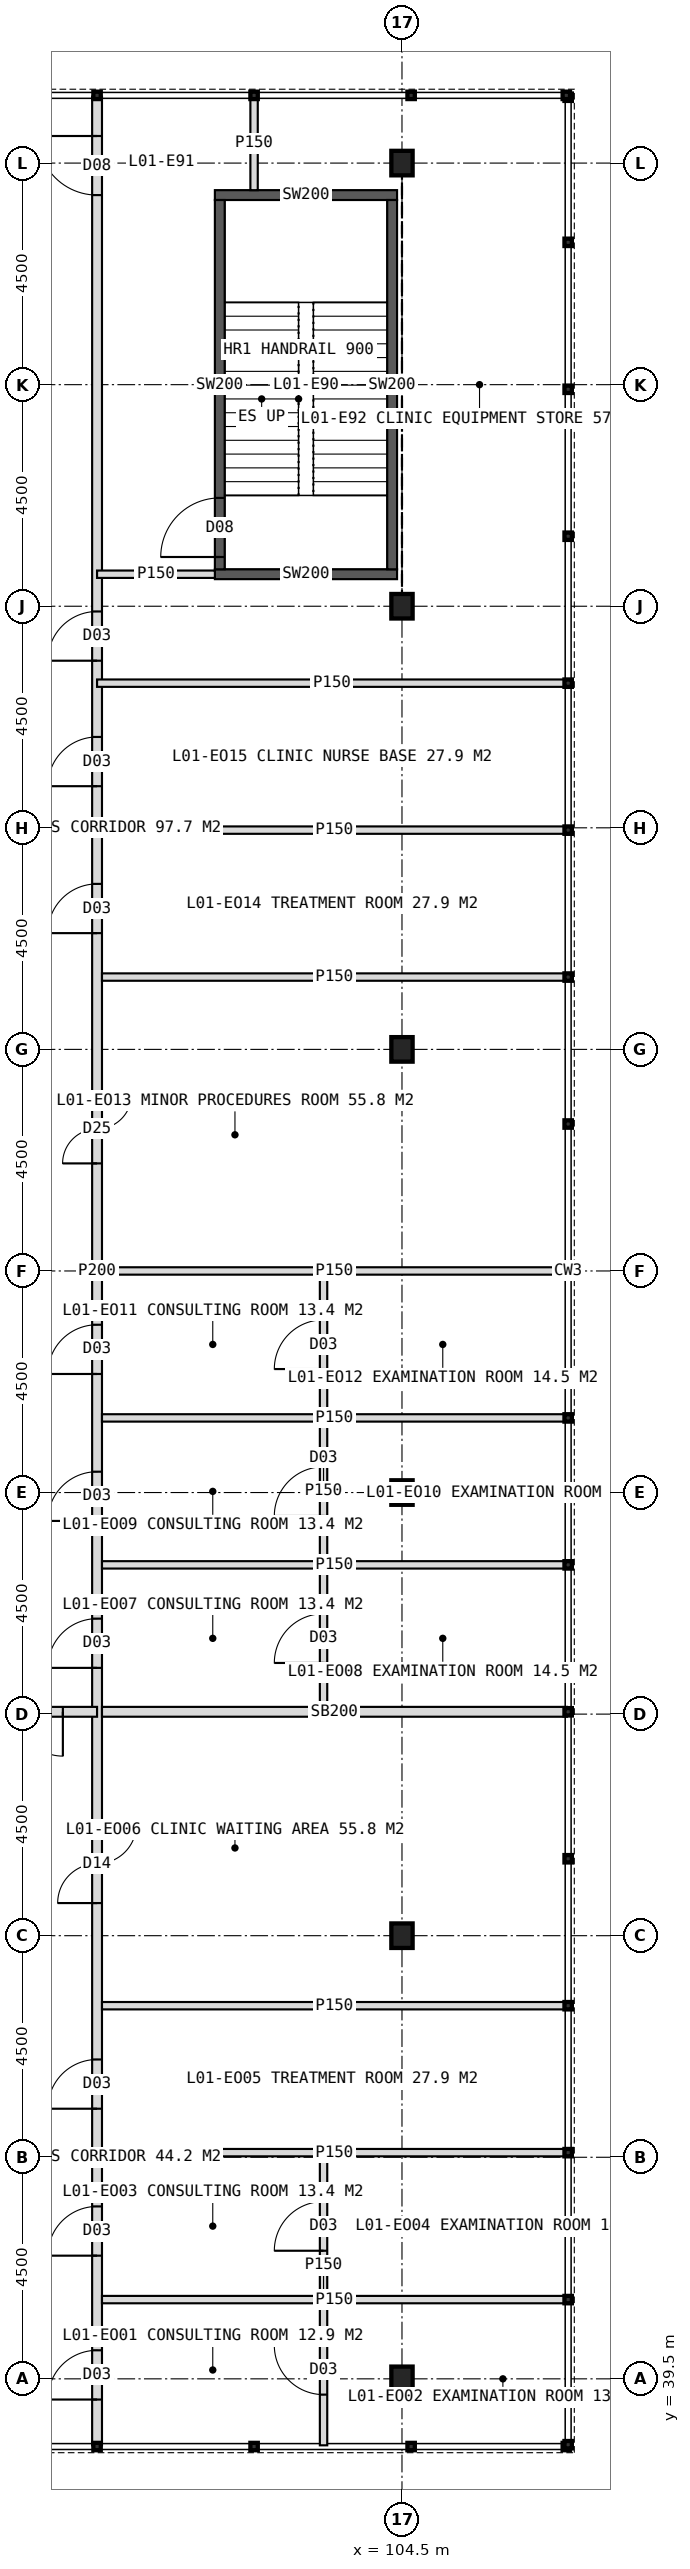
"""IFC4 building model, lengths in metres.
Left out: names, types, materials, properties, quantities, classifications, styles, units other than length and angle.
Written with IfcOpenShell. Run it as: python <this file> out.ifc"""

import sys

from ifc_helpers import new_model, si_unit, direction, frame, frame_2d, origin, origin_2d, place, context, subcontext, project, spatial, rectangle, i_section, extrude, element, fill, save


model = new_model("IFC4")
c1 = context("Model", 3, precision=1e-05, world=origin(), true_north=direction((0.0, 1.0)))
c2 = subcontext(c1, "Body", "Model", "MODEL_VIEW")
j1 = project(units=[si_unit("LENGTHUNIT", "METRE"), si_unit("PLANEANGLEUNIT", "RADIAN")], contexts=[c1])
p1 = place(None, origin())
s1 = spatial("IfcSite", under=j1, at=p1, CompositionType="ELEMENT")
p2 = place(p1, origin())
s2 = spatial("IfcBuilding", under=s1, at=p2, CompositionType="ELEMENT")
p3 = place(p2, frame((0.0, 0.0, 6.0)))
s3 = spatial("IfcBuildingStorey", under=s2, at=p3, CompositionType="ELEMENT", Elevation=6.0)
for number, where, z_axis, x_axis in (
    (1, (104.5, 39.5, 0.0), (0.0, 0.0, 1.0), (1.0, 0.0, 0.0)),
    (2, (104.5, 48.5, 0.0), (0.0, 0.0, 1.0), (1.0, 0.0, 0.0)),
    (3, (104.5, 57.5, 0.0), (0.0, 0.0, 1.0), (1.0, 0.0, 0.0)),
    (4, (104.5, 66.5, 0.0), (0.0, 0.0, 1.0), (1.0, 0.0, 0.0)),
    (5, (104.5, 75.5, 0.0), (0.0, 0.0, 1.0), (1.0, 0.0, 0.0)),
    (6, (104.5, 84.5, 0.0), (0.0, 0.0, 1.0), (1.0, 0.0, 0.0)),
):
    element("IfcColumn", number, at=place(p3, frame(where, z_axis=z_axis, x_axis=x_axis)), inside=s3, PredefinedType="COLUMN", context=c2, shape_type="SweptSolid", body=[
        extrude(i_section(OverallWidth=0.432, OverallDepth=0.498, WebThickness=0.056, FlangeThickness=0.089, FilletRadius=0.015, at=origin_2d()), origin(), (0.0, 0.0, 1.0), 5.0),
    ])
p4 = place(p3, frame((98.307, 38.15, 0.0), z_axis=(0.0, 0.0, 1.0), x_axis=(0.0, 1.0, 0.0)))
e7 = element("IfcWall", 7, at=p4, inside=s3, PredefinedType="PARTITIONING", context=c2, shape_type="SweptSolid", body=[
    extrude(rectangle(XDim=47.7, YDim=0.2, at=frame_2d((23.85, 0.0))), origin(), (0.0, 0.0, 1.0), 4.7),
])
p5 = place(p4, frame((45.7, 0.0, 0.0)))
e8 = element("IfcOpeningElement", 8, at=p5, cuts=e7, PredefinedType="OPENING", context=c2, shape_type="SweptSolid", body=[
    extrude(rectangle(XDim=1.2, YDim=2.1, at=frame_2d((0.6, 1.05))), frame((0.0, 0.11, 0.0), z_axis=(0.0, -1.0, 0.0), x_axis=(1.0, 0.0, 0.0)), (0.0, 0.0, 1.0), 0.22),
])
p6 = place(p4, frame((36.244, 0.0, 0.0)))
e9 = element("IfcOpeningElement", 9, at=p6, cuts=e7, PredefinedType="OPENING", context=c2, shape_type="SweptSolid", body=[
    extrude(rectangle(XDim=1.0, YDim=2.1, at=frame_2d((0.5, 1.05))), frame((0.0, 0.11, 0.0), z_axis=(0.0, -1.0, 0.0), x_axis=(1.0, 0.0, 0.0)), (0.0, 0.0, 1.0), 0.22),
])
p7 = place(p4, frame((0.93, 0.0, 0.0)))
e10 = element("IfcOpeningElement", 10, at=p7, cuts=e7, PredefinedType="OPENING", context=c2, shape_type="SweptSolid", body=[
    extrude(rectangle(XDim=1.0, YDim=2.1, at=frame_2d((0.5, 1.05))), frame((0.0, 0.11, 0.0), z_axis=(0.0, -1.0, 0.0), x_axis=(1.0, 0.0, 0.0)), (0.0, 0.0, 1.0), 0.22),
])
p8 = place(p4, frame((3.852, 0.0, 0.0)))
e11 = element("IfcOpeningElement", 11, at=p8, cuts=e7, PredefinedType="OPENING", context=c2, shape_type="SweptSolid", body=[
    extrude(rectangle(XDim=1.0, YDim=2.1, at=frame_2d((0.5, 1.05))), frame((0.0, 0.11, 0.0), z_axis=(0.0, -1.0, 0.0), x_axis=(1.0, 0.0, 0.0)), (0.0, 0.0, 1.0), 0.22),
])
p9 = place(p4, frame((6.836, 0.0, 0.0)))
e12 = element("IfcOpeningElement", 12, at=p9, cuts=e7, PredefinedType="OPENING", context=c2, shape_type="SweptSolid", body=[
    extrude(rectangle(XDim=1.0, YDim=2.1, at=frame_2d((0.5, 1.05))), frame((0.0, 0.11, 0.0), z_axis=(0.0, -1.0, 0.0), x_axis=(1.0, 0.0, 0.0)), (0.0, 0.0, 1.0), 0.22),
])
p10 = place(p4, frame((11.012, 0.0, 0.0)))
e13 = element("IfcOpeningElement", 13, at=p10, cuts=e7, PredefinedType="OPENING", context=c2, shape_type="SweptSolid", body=[
    extrude(rectangle(XDim=1.6, YDim=2.2, at=frame_2d((0.8, 1.1))), frame((0.0, 0.11, 0.0), z_axis=(0.0, -1.0, 0.0), x_axis=(1.0, 0.0, 0.0)), (0.0, 0.0, 1.0), 0.22),
])
p11 = place(p4, frame((15.789, 0.0, 0.0)))
e14 = element("IfcOpeningElement", 14, at=p11, cuts=e7, PredefinedType="OPENING", context=c2, shape_type="SweptSolid", body=[
    extrude(rectangle(XDim=1.0, YDim=2.1, at=frame_2d((0.5, 1.05))), frame((0.0, 0.11, 0.0), z_axis=(0.0, -1.0, 0.0), x_axis=(1.0, 0.0, 0.0)), (0.0, 0.0, 1.0), 0.22),
])
p12 = place(p4, frame((18.773, 0.0, 0.0)))
e15 = element("IfcOpeningElement", 15, at=p12, cuts=e7, PredefinedType="OPENING", context=c2, shape_type="SweptSolid", body=[
    extrude(rectangle(XDim=1.0, YDim=2.1, at=frame_2d((0.5, 1.05))), frame((0.0, 0.11, 0.0), z_axis=(0.0, -1.0, 0.0), x_axis=(1.0, 0.0, 0.0)), (0.0, 0.0, 1.0), 0.22),
])
p13 = place(p4, frame((21.758, 0.0, 0.0)))
e16 = element("IfcOpeningElement", 16, at=p13, cuts=e7, PredefinedType="OPENING", context=c2, shape_type="SweptSolid", body=[
    extrude(rectangle(XDim=1.0, YDim=2.1, at=frame_2d((0.5, 1.05))), frame((0.0, 0.11, 0.0), z_axis=(0.0, -1.0, 0.0), x_axis=(1.0, 0.0, 0.0)), (0.0, 0.0, 1.0), 0.22),
])
p14 = place(p4, frame((26.034, 0.0, 0.0)))
e17 = element("IfcOpeningElement", 17, at=p14, cuts=e7, PredefinedType="OPENING", context=c2, shape_type="SweptSolid", body=[
    extrude(rectangle(XDim=1.4, YDim=2.2, at=frame_2d((0.7, 1.1))), frame((0.0, 0.11, 0.0), z_axis=(0.0, -1.0, 0.0), x_axis=(1.0, 0.0, 0.0)), (0.0, 0.0, 1.0), 0.22),
])
p15 = place(p4, frame((30.711, 0.0, 0.0)))
e18 = element("IfcOpeningElement", 18, at=p15, cuts=e7, PredefinedType="OPENING", context=c2, shape_type="SweptSolid", body=[
    extrude(rectangle(XDim=1.0, YDim=2.1, at=frame_2d((0.5, 1.05))), frame((0.0, 0.11, 0.0), z_axis=(0.0, -1.0, 0.0), x_axis=(1.0, 0.0, 0.0)), (0.0, 0.0, 1.0), 0.22),
])
p16 = place(p4, frame((33.695, 0.0, 0.0)))
e19 = element("IfcOpeningElement", 19, at=p16, cuts=e7, PredefinedType="OPENING", context=c2, shape_type="SweptSolid", body=[
    extrude(rectangle(XDim=1.0, YDim=2.1, at=frame_2d((0.5, 1.05))), frame((0.0, 0.11, 0.0), z_axis=(0.0, -1.0, 0.0), x_axis=(1.0, 0.0, 0.0)), (0.0, 0.0, 1.0), 0.22),
])
p17 = place(p3, frame((98.307, 53.047, 0.0), z_axis=(0.0, 0.0, 1.0), x_axis=(-1.0, 0.0, 0.0)))
e20 = element("IfcWall", 20, at=p17, inside=s3, PredefinedType="SOLIDWALL", context=c2, shape_type="SweptSolid", body=[
    extrude(rectangle(XDim=3.189, YDim=0.2, at=frame_2d((1.594, 0.0))), origin(), (0.0, 0.0, 1.0), 4.7),
])
p18 = place(p17, frame((0.695, 0.0, 0.0)))
e21 = element("IfcOpeningElement", 21, at=p18, cuts=e20, PredefinedType="OPENING", context=c2, shape_type="SweptSolid", body=[
    extrude(rectangle(XDim=1.8, YDim=2.2, at=frame_2d((0.9, 1.1))), frame((0.0, 0.11, 0.0), z_axis=(0.0, -1.0, 0.0), x_axis=(1.0, 0.0, 0.0)), (0.0, 0.0, 1.0), 0.22),
])
for number, where, z_axis, x_axis in (
    (22, (100.7, 76.15, 0.0), (0.0, 0.0, 1.0), (1.0, 0.0, 0.0)),
    (23, (100.7, 83.85, 0.0), (0.0, 0.0, 1.0), (1.0, 0.0, 0.0)),
):
    element("IfcWall", number, at=place(p3, frame(where, z_axis=z_axis, x_axis=x_axis)), inside=s3, PredefinedType="SOLIDWALL", context=c2, shape_type="SweptSolid", body=[
        extrude(rectangle(XDim=3.7, YDim=0.2, at=frame_2d((1.85, 0.0))), origin(), (0.0, 0.0, 1.0), 4.7),
    ])
p19 = place(p3, frame((100.8, 76.25, 0.0), z_axis=(0.0, 0.0, 1.0), x_axis=(0.0, 1.0, 0.0)))
e24 = element("IfcWall", 24, at=p19, inside=s3, PredefinedType="SOLIDWALL", context=c2, shape_type="SweptSolid", body=[
    extrude(rectangle(XDim=7.5, YDim=0.2, at=frame_2d((3.75, 0.0))), origin(), (0.0, 0.0, 1.0), 4.7),
])
p20 = place(p19, frame((0.25, 0.0, 0.0)))
e25 = element("IfcOpeningElement", 25, at=p20, cuts=e24, PredefinedType="OPENING", context=c2, shape_type="SweptSolid", body=[
    extrude(rectangle(XDim=1.2, YDim=2.1, at=frame_2d((0.6, 1.05))), frame((0.0, 0.11, 0.0), z_axis=(0.0, -1.0, 0.0), x_axis=(1.0, 0.0, 0.0)), (0.0, 0.0, 1.0), 0.22),
])
p21 = place(p3, frame((104.3, 76.25, 0.0), z_axis=(0.0, 0.0, 1.0), x_axis=(0.0, 1.0, 0.0)))
e26 = element("IfcWall", 26, at=p21, inside=s3, PredefinedType="SOLIDWALL", context=c2, shape_type="SweptSolid", body=[
    extrude(rectangle(XDim=7.5, YDim=0.2, at=frame_2d((3.75, 0.0))), origin(), (0.0, 0.0, 1.0), 4.7),
])
p22 = place(p3, frame((100.7, 76.15, 0.0), z_axis=(0.0, 0.0, 1.0), x_axis=(-1.0, 0.0, 0.0)))
e27 = element("IfcWall", 27, at=p22, inside=s3, PredefinedType="PARTITIONING", context=c2, shape_type="SweptSolid", body=[
    extrude(rectangle(XDim=2.393, YDim=0.15, at=frame_2d((1.197, 0.0))), origin(), (0.0, 0.0, 1.0), 4.7),
])
p23 = place(p3, frame((101.496, 83.95, 0.0), z_axis=(0.0, 0.0, 1.0), x_axis=(0.0, 1.0, 0.0)))
e28 = element("IfcWall", 28, at=p23, inside=s3, PredefinedType="PARTITIONING", context=c2, shape_type="SweptSolid", body=[
    extrude(rectangle(XDim=1.9, YDim=0.15, at=frame_2d((0.95, 0.0))), origin(), (0.0, 0.0, 1.0), 4.7),
])
p24 = place(p3, frame((107.85, 73.938, 0.0), z_axis=(0.0, 0.0, 1.0), x_axis=(-1.0, 0.0, 0.0)))
e29 = element("IfcWall", 29, at=p24, inside=s3, PredefinedType="PARTITIONING", context=c2, shape_type="SweptSolid", body=[
    extrude(rectangle(XDim=9.543, YDim=0.15, at=frame_2d((4.771, 0.0))), origin(), (0.0, 0.0, 1.0), 4.7),
])
for number, where, z_axis, x_axis in (
    (30, (107.85, 41.109, 0.0), (0.0, 0.0, 1.0), (-1.0, 0.0, 0.0)),
    (31, (107.85, 44.094, 0.0), (0.0, 0.0, 1.0), (-1.0, 0.0, 0.0)),
    (32, (107.85, 47.078, 0.0), (0.0, 0.0, 1.0), (-1.0, 0.0, 0.0)),
):
    element("IfcWall", number, at=place(p3, frame(where, z_axis=z_axis, x_axis=x_axis)), inside=s3, PredefinedType="PARTITIONING", context=c2, shape_type="SweptSolid", body=[
        extrude(rectangle(XDim=9.443, YDim=0.15, at=frame_2d((4.722, 0.0))), origin(), (0.0, 0.0, 1.0), 4.7),
    ])
p25 = place(p3, frame((107.85, 53.047, 0.0), z_axis=(0.0, 0.0, 1.0), x_axis=(-1.0, 0.0, 0.0)))
e33 = element("IfcWall", 33, at=p25, inside=s3, PredefinedType="SOLIDWALL", context=c2, shape_type="SweptSolid", body=[
    extrude(rectangle(XDim=9.443, YDim=0.2, at=frame_2d((4.722, 0.0))), origin(), (0.0, 0.0, 1.0), 4.7),
])
for number, where, z_axis, x_axis in (
    (34, (107.85, 56.031, 0.0), (0.0, 0.0, 1.0), (-1.0, 0.0, 0.0)),
    (35, (107.85, 59.016, 0.0), (0.0, 0.0, 1.0), (-1.0, 0.0, 0.0)),
    (36, (107.85, 62.0, 0.0), (0.0, 0.0, 1.0), (-1.0, 0.0, 0.0)),
    (37, (107.85, 67.969, 0.0), (0.0, 0.0, 1.0), (-1.0, 0.0, 0.0)),
    (38, (107.85, 70.953, 0.0), (0.0, 0.0, 1.0), (-1.0, 0.0, 0.0)),
):
    element("IfcWall", number, at=place(p3, frame(where, z_axis=z_axis, x_axis=x_axis)), inside=s3, PredefinedType="PARTITIONING", context=c2, shape_type="SweptSolid", body=[
        extrude(rectangle(XDim=9.443, YDim=0.15, at=frame_2d((4.722, 0.0))), origin(), (0.0, 0.0, 1.0), 4.7),
    ])
p26 = place(p3, frame((102.907, 38.15, 0.0), z_axis=(0.0, 0.0, 1.0), x_axis=(0.0, 1.0, 0.0)))
e39 = element("IfcWall", 39, at=p26, inside=s3, PredefinedType="PARTITIONING", context=c2, shape_type="SweptSolid", body=[
    extrude(rectangle(XDim=5.944, YDim=0.15, at=frame_2d((2.972, 0.0))), origin(), (0.0, 0.0, 1.0), 4.7),
])
p27 = place(p26, frame((1.03, 0.0, 0.0)))
e40 = element("IfcOpeningElement", 40, at=p27, cuts=e39, PredefinedType="OPENING", context=c2, shape_type="SweptSolid", body=[
    extrude(rectangle(XDim=1.0, YDim=2.1, at=frame_2d((0.5, 1.05))), frame((0.0, 0.085, 0.0), z_axis=(0.0, -1.0, 0.0), x_axis=(1.0, 0.0, 0.0)), (0.0, 0.0, 1.0), 0.17),
])
p28 = place(p26, frame((3.952, 0.0, 0.0)))
e41 = element("IfcOpeningElement", 41, at=p28, cuts=e39, PredefinedType="OPENING", context=c2, shape_type="SweptSolid", body=[
    extrude(rectangle(XDim=1.0, YDim=2.1, at=frame_2d((0.5, 1.05))), frame((0.0, 0.085, 0.0), z_axis=(0.0, -1.0, 0.0), x_axis=(1.0, 0.0, 0.0)), (0.0, 0.0, 1.0), 0.17),
])
p29 = place(p3, frame((102.907, 53.047, 0.0), z_axis=(0.0, 0.0, 1.0), x_axis=(0.0, 1.0, 0.0)))
e42 = element("IfcWall", 42, at=p29, inside=s3, PredefinedType="PARTITIONING", context=c2, shape_type="SweptSolid", body=[
    extrude(rectangle(XDim=8.953, YDim=0.15, at=frame_2d((4.477, 0.0))), origin(), (0.0, 0.0, 1.0), 4.7),
])
p30 = place(p29, frame((0.992, 0.0, 0.0)))
e43 = element("IfcOpeningElement", 43, at=p30, cuts=e42, PredefinedType="OPENING", context=c2, shape_type="SweptSolid", body=[
    extrude(rectangle(XDim=1.0, YDim=2.1, at=frame_2d((0.5, 1.05))), frame((0.0, 0.085, 0.0), z_axis=(0.0, -1.0, 0.0), x_axis=(1.0, 0.0, 0.0)), (0.0, 0.0, 1.0), 0.17),
])
p31 = place(p29, frame((3.977, 0.0, 0.0)))
e44 = element("IfcOpeningElement", 44, at=p31, cuts=e42, PredefinedType="OPENING", context=c2, shape_type="SweptSolid", body=[
    extrude(rectangle(XDim=1.0, YDim=2.1, at=frame_2d((0.5, 1.05))), frame((0.0, 0.085, 0.0), z_axis=(0.0, -1.0, 0.0), x_axis=(1.0, 0.0, 0.0)), (0.0, 0.0, 1.0), 0.17),
])
p32 = place(p29, frame((6.961, 0.0, 0.0)))
e45 = element("IfcOpeningElement", 45, at=p32, cuts=e42, PredefinedType="OPENING", context=c2, shape_type="SweptSolid", body=[
    extrude(rectangle(XDim=1.0, YDim=2.1, at=frame_2d((0.5, 1.05))), frame((0.0, 0.085, 0.0), z_axis=(0.0, -1.0, 0.0), x_axis=(1.0, 0.0, 0.0)), (0.0, 0.0, 1.0), 0.17),
])
p33 = place(p18, origin())
e46 = element("IfcDoor", 46, at=p33, inside=s3, OperationType="DOUBLE_DOOR_DOUBLE_SWING", PredefinedType="DOOR", context=c2, shape_type="SweptSolid", body=[
    extrude(rectangle(XDim=1.8, YDim=2.2, at=frame_2d((0.9, 1.1))), frame((0.0, 0.025, 0.0), z_axis=(0.0, -1.0, 0.0), x_axis=(1.0, 0.0, 0.0)), (0.0, 0.0, 1.0), 0.05),
])
fill(e21, e46)
p34 = place(p20, origin())
e47 = element("IfcDoor", 47, at=p34, inside=s3, OperationType="SINGLE_SWING_LEFT", PredefinedType="DOOR", context=c2, shape_type="SweptSolid", body=[
    extrude(rectangle(XDim=1.2, YDim=2.1, at=frame_2d((0.6, 1.05))), frame((0.0, 0.025, 0.0), z_axis=(0.0, -1.0, 0.0), x_axis=(1.0, 0.0, 0.0)), (0.0, 0.0, 1.0), 0.05),
])
fill(e25, e47)
p35 = place(p5, origin())
e48 = element("IfcDoor", 48, at=p35, inside=s3, OperationType="SINGLE_SWING_RIGHT", PredefinedType="DOOR", context=c2, shape_type="SweptSolid", body=[
    extrude(rectangle(XDim=1.2, YDim=2.1, at=frame_2d((0.6, 1.05))), frame((0.0, 0.025, 0.0), z_axis=(0.0, -1.0, 0.0), x_axis=(1.0, 0.0, 0.0)), (0.0, 0.0, 1.0), 0.05),
])
fill(e8, e48)
p36 = place(p6, origin())
e49 = element("IfcDoor", 49, at=p36, inside=s3, OperationType="SINGLE_SWING_LEFT", PredefinedType="DOOR", context=c2, shape_type="SweptSolid", body=[
    extrude(rectangle(XDim=1.0, YDim=2.1, at=frame_2d((0.5, 1.05))), frame((0.0, 0.025, 0.0), z_axis=(0.0, -1.0, 0.0), x_axis=(1.0, 0.0, 0.0)), (0.0, 0.0, 1.0), 0.05),
])
fill(e9, e49)
p37 = place(p7, origin())
e50 = element("IfcDoor", 50, at=p37, inside=s3, OperationType="SINGLE_SWING_LEFT", PredefinedType="DOOR", context=c2, shape_type="SweptSolid", body=[
    extrude(rectangle(XDim=1.0, YDim=2.1, at=frame_2d((0.5, 1.05))), frame((0.0, 0.025, 0.0), z_axis=(0.0, -1.0, 0.0), x_axis=(1.0, 0.0, 0.0)), (0.0, 0.0, 1.0), 0.05),
])
fill(e10, e50)
p38 = place(p27, origin())
e51 = element("IfcDoor", 51, at=p38, inside=s3, OperationType="SINGLE_SWING_RIGHT", PredefinedType="DOOR", context=c2, shape_type="SweptSolid", body=[
    extrude(rectangle(XDim=1.0, YDim=2.1, at=frame_2d((0.5, 1.05))), frame((0.0, 0.025, 0.0), z_axis=(0.0, -1.0, 0.0), x_axis=(1.0, 0.0, 0.0)), (0.0, 0.0, 1.0), 0.05),
])
fill(e40, e51)
p39 = place(p8, origin())
e52 = element("IfcDoor", 52, at=p39, inside=s3, OperationType="SINGLE_SWING_LEFT", PredefinedType="DOOR", context=c2, shape_type="SweptSolid", body=[
    extrude(rectangle(XDim=1.0, YDim=2.1, at=frame_2d((0.5, 1.05))), frame((0.0, 0.025, 0.0), z_axis=(0.0, -1.0, 0.0), x_axis=(1.0, 0.0, 0.0)), (0.0, 0.0, 1.0), 0.05),
])
fill(e11, e52)
p40 = place(p28, origin())
e53 = element("IfcDoor", 53, at=p40, inside=s3, OperationType="SINGLE_SWING_LEFT", PredefinedType="DOOR", context=c2, shape_type="SweptSolid", body=[
    extrude(rectangle(XDim=1.0, YDim=2.1, at=frame_2d((0.5, 1.05))), frame((0.0, 0.025, 0.0), z_axis=(0.0, -1.0, 0.0), x_axis=(1.0, 0.0, 0.0)), (0.0, 0.0, 1.0), 0.05),
])
fill(e41, e53)
p41 = place(p9, origin())
e54 = element("IfcDoor", 54, at=p41, inside=s3, OperationType="SINGLE_SWING_LEFT", PredefinedType="DOOR", context=c2, shape_type="SweptSolid", body=[
    extrude(rectangle(XDim=1.0, YDim=2.1, at=frame_2d((0.5, 1.05))), frame((0.0, 0.025, 0.0), z_axis=(0.0, -1.0, 0.0), x_axis=(1.0, 0.0, 0.0)), (0.0, 0.0, 1.0), 0.05),
])
fill(e12, e54)
p42 = place(p10, origin())
e55 = element("IfcDoor", 55, at=p42, inside=s3, OperationType="DOUBLE_DOOR_DOUBLE_SWING", PredefinedType="DOOR", context=c2, shape_type="SweptSolid", body=[
    extrude(rectangle(XDim=1.6, YDim=2.2, at=frame_2d((0.8, 1.1))), frame((0.0, 0.025, 0.0), z_axis=(0.0, -1.0, 0.0), x_axis=(1.0, 0.0, 0.0)), (0.0, 0.0, 1.0), 0.05),
])
fill(e13, e55)
p43 = place(p11, origin())
e56 = element("IfcDoor", 56, at=p43, inside=s3, OperationType="SINGLE_SWING_LEFT", PredefinedType="DOOR", context=c2, shape_type="SweptSolid", body=[
    extrude(rectangle(XDim=1.0, YDim=2.1, at=frame_2d((0.5, 1.05))), frame((0.0, 0.025, 0.0), z_axis=(0.0, -1.0, 0.0), x_axis=(1.0, 0.0, 0.0)), (0.0, 0.0, 1.0), 0.05),
])
fill(e14, e56)
p44 = place(p30, origin())
e57 = element("IfcDoor", 57, at=p44, inside=s3, OperationType="SINGLE_SWING_LEFT", PredefinedType="DOOR", context=c2, shape_type="SweptSolid", body=[
    extrude(rectangle(XDim=1.0, YDim=2.1, at=frame_2d((0.5, 1.05))), frame((0.0, 0.025, 0.0), z_axis=(0.0, -1.0, 0.0), x_axis=(1.0, 0.0, 0.0)), (0.0, 0.0, 1.0), 0.05),
])
fill(e43, e57)
p45 = place(p12, origin())
e58 = element("IfcDoor", 58, at=p45, inside=s3, OperationType="SINGLE_SWING_LEFT", PredefinedType="DOOR", context=c2, shape_type="SweptSolid", body=[
    extrude(rectangle(XDim=1.0, YDim=2.1, at=frame_2d((0.5, 1.05))), frame((0.0, 0.025, 0.0), z_axis=(0.0, -1.0, 0.0), x_axis=(1.0, 0.0, 0.0)), (0.0, 0.0, 1.0), 0.05),
])
fill(e15, e58)
p46 = place(p31, origin())
e59 = element("IfcDoor", 59, at=p46, inside=s3, OperationType="SINGLE_SWING_LEFT", PredefinedType="DOOR", context=c2, shape_type="SweptSolid", body=[
    extrude(rectangle(XDim=1.0, YDim=2.1, at=frame_2d((0.5, 1.05))), frame((0.0, 0.025, 0.0), z_axis=(0.0, -1.0, 0.0), x_axis=(1.0, 0.0, 0.0)), (0.0, 0.0, 1.0), 0.05),
])
fill(e44, e59)
p47 = place(p13, origin())
e60 = element("IfcDoor", 60, at=p47, inside=s3, OperationType="SINGLE_SWING_LEFT", PredefinedType="DOOR", context=c2, shape_type="SweptSolid", body=[
    extrude(rectangle(XDim=1.0, YDim=2.1, at=frame_2d((0.5, 1.05))), frame((0.0, 0.025, 0.0), z_axis=(0.0, -1.0, 0.0), x_axis=(1.0, 0.0, 0.0)), (0.0, 0.0, 1.0), 0.05),
])
fill(e16, e60)
p48 = place(p32, origin())
e61 = element("IfcDoor", 61, at=p48, inside=s3, OperationType="SINGLE_SWING_LEFT", PredefinedType="DOOR", context=c2, shape_type="SweptSolid", body=[
    extrude(rectangle(XDim=1.0, YDim=2.1, at=frame_2d((0.5, 1.05))), frame((0.0, 0.025, 0.0), z_axis=(0.0, -1.0, 0.0), x_axis=(1.0, 0.0, 0.0)), (0.0, 0.0, 1.0), 0.05),
])
fill(e45, e61)
p49 = place(p14, origin())
e62 = element("IfcDoor", 62, at=p49, inside=s3, OperationType="DOUBLE_DOOR_SINGLE_SWING", PredefinedType="DOOR", context=c2, shape_type="SweptSolid", body=[
    extrude(rectangle(XDim=1.4, YDim=2.2, at=frame_2d((0.7, 1.1))), frame((0.0, 0.025, 0.0), z_axis=(0.0, -1.0, 0.0), x_axis=(1.0, 0.0, 0.0)), (0.0, 0.0, 1.0), 0.05),
])
fill(e17, e62)
p50 = place(p15, origin())
e63 = element("IfcDoor", 63, at=p50, inside=s3, OperationType="SINGLE_SWING_LEFT", PredefinedType="DOOR", context=c2, shape_type="SweptSolid", body=[
    extrude(rectangle(XDim=1.0, YDim=2.1, at=frame_2d((0.5, 1.05))), frame((0.0, 0.025, 0.0), z_axis=(0.0, -1.0, 0.0), x_axis=(1.0, 0.0, 0.0)), (0.0, 0.0, 1.0), 0.05),
])
fill(e18, e63)
p51 = place(p16, origin())
e64 = element("IfcDoor", 64, at=p51, inside=s3, OperationType="SINGLE_SWING_LEFT", PredefinedType="DOOR", context=c2, shape_type="SweptSolid", body=[
    extrude(rectangle(XDim=1.0, YDim=2.1, at=frame_2d((0.5, 1.05))), frame((0.0, 0.025, 0.0), z_axis=(0.0, -1.0, 0.0), x_axis=(1.0, 0.0, 0.0)), (0.0, 0.0, 1.0), 0.05),
])
fill(e19, e64)
save(model, sys.argv[1])
